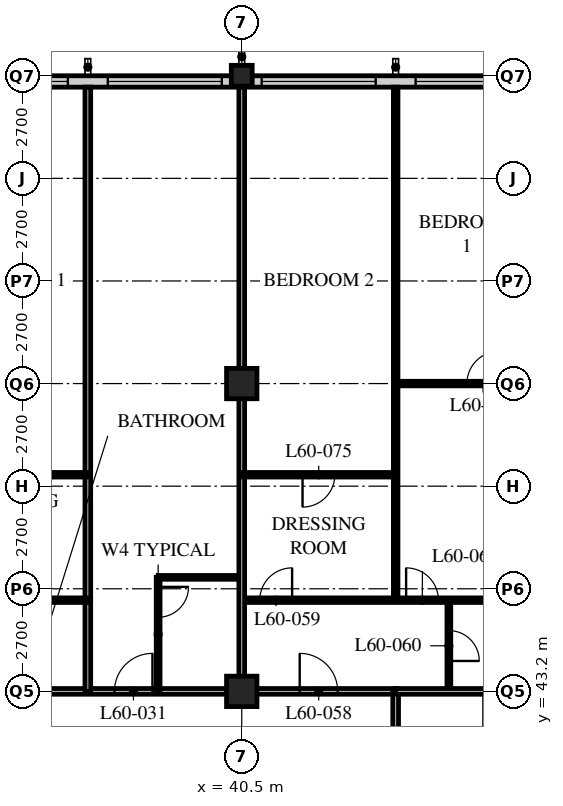
"""IFC4 building model, lengths in metres.
Left out: names, types, materials, properties, quantities, classifications, styles, units other than length and angle.
Written with IfcOpenShell. Run it as: python <this file> out.ifc"""

import sys

from ifc_helpers import new_model, si_unit, direction, frame, frame_2d, origin, origin_2d, place, context, subcontext, project, spatial, rectangle, hollow_rectangle, extrude, element, fill, save


model = new_model("IFC4")
c1 = context("Model", 3, precision=1e-05, world=origin(), true_north=direction((0.0, 1.0)))
c2 = subcontext(c1, "Body", "Model", "MODEL_VIEW")
j1 = project(units=[si_unit("LENGTHUNIT", "METRE"), si_unit("PLANEANGLEUNIT", "RADIAN")], contexts=[c1])
p1 = place(None, origin())
s1 = spatial("IfcSite", under=j1, at=p1, CompositionType="ELEMENT")
p2 = place(p1, origin())
s2 = spatial("IfcBuilding", under=s1, at=p2, CompositionType="ELEMENT")
p3 = place(p2, frame((0.0, 0.0, 231.6)))
s3 = spatial("IfcBuildingStorey", under=s2, at=p3, CompositionType="ELEMENT", Elevation=231.6)
for number, where, z_axis, x_axis in (
    (1, (40.5, 43.2, 0.0), (0.0, 0.0, 1.0), (1.0, 0.0, 0.0)),
    (2, (40.5, 51.3, 0.0), (0.0, 0.0, 1.0), (1.0, 0.0, 0.0)),
):
    element("IfcColumn", number, at=place(p3, frame(where, z_axis=z_axis, x_axis=x_axis)), inside=s3, PredefinedType="COLUMN", context=c2, shape_type="SweptSolid", body=[
        extrude(hollow_rectangle(XDim=0.8, YDim=0.8, WallThickness=0.08, at=origin_2d()), origin(), (0.0, 0.0, 1.0), 3.6),
    ])
p4 = place(p3, frame((40.5, 59.4, 0.0), z_axis=(0.0, 0.0, 1.0), x_axis=(1.0, 0.0, 0.0)))
e3 = element("IfcColumn", 3, at=p4, inside=s3, PredefinedType="COLUMN", context=c2, shape_type="SweptSolid", body=[
    extrude(hollow_rectangle(XDim=0.55, YDim=0.55, WallThickness=0.045, at=origin_2d()), origin(), (0.0, 0.0, 1.0), 3.6),
])
p5 = place(p3, frame((48.3, 59.25, 0.0), z_axis=(0.0, 0.0, 1.0), x_axis=(-1.0, 0.0, 0.0)))
e4 = element("IfcWall", 4, at=p5, inside=s3, PredefinedType="SOLIDWALL", context=c2, shape_type="SweptSolid", body=[
    extrude(rectangle(XDim=40.2, YDim=0.3, at=frame_2d((20.1, 0.0))), origin(), (0.0, 0.0, 1.0), 2.35),
])
p6 = place(p5, frame((0.225, 0.0, 0.6)))
e5 = element("IfcOpeningElement", 5, at=p6, cuts=e4, PredefinedType="OPENING", context=c2, shape_type="SweptSolid", body=[
    extrude(rectangle(XDim=3.0, YDim=1.7, at=frame_2d((1.5, 0.85))), frame((0.0, 0.16, 0.0), z_axis=(0.0, -1.0, 0.0), x_axis=(1.0, 0.0, 0.0)), (0.0, 0.0, 1.0), 0.32),
])
p7 = place(p5, frame((4.275, 0.0, 0.6)))
e6 = element("IfcOpeningElement", 6, at=p7, cuts=e4, PredefinedType="OPENING", context=c2, shape_type="SweptSolid", body=[
    extrude(rectangle(XDim=3.0, YDim=1.7, at=frame_2d((1.5, 0.85))), frame((0.0, 0.16, 0.0), z_axis=(0.0, -1.0, 0.0), x_axis=(1.0, 0.0, 0.0)), (0.0, 0.0, 1.0), 0.32),
])
p8 = place(p5, frame((8.325, 0.0, 0.6)))
e7 = element("IfcOpeningElement", 7, at=p8, cuts=e4, PredefinedType="OPENING", context=c2, shape_type="SweptSolid", body=[
    extrude(rectangle(XDim=3.0, YDim=1.7, at=frame_2d((1.5, 0.85))), frame((0.0, 0.16, 0.0), z_axis=(0.0, -1.0, 0.0), x_axis=(1.0, 0.0, 0.0)), (0.0, 0.0, 1.0), 0.32),
])
p9 = place(p5, frame((12.375, 0.0, 0.6)))
e8 = element("IfcOpeningElement", 8, at=p9, cuts=e4, PredefinedType="OPENING", context=c2, shape_type="SweptSolid", body=[
    extrude(rectangle(XDim=3.0, YDim=1.7, at=frame_2d((1.5, 0.85))), frame((0.0, 0.16, 0.0), z_axis=(0.0, -1.0, 0.0), x_axis=(1.0, 0.0, 0.0)), (0.0, 0.0, 1.0), 0.32),
])
p10 = place(p5, frame((16.425, 0.0, 0.6)))
e9 = element("IfcOpeningElement", 9, at=p10, cuts=e4, PredefinedType="OPENING", context=c2, shape_type="SweptSolid", body=[
    extrude(rectangle(XDim=3.0, YDim=1.7, at=frame_2d((1.5, 0.85))), frame((0.0, 0.16, 0.0), z_axis=(0.0, -1.0, 0.0), x_axis=(1.0, 0.0, 0.0)), (0.0, 0.0, 1.0), 0.32),
])
p11 = place(p5, frame((20.475, 0.0, 0.6)))
e10 = element("IfcOpeningElement", 10, at=p11, cuts=e4, PredefinedType="OPENING", context=c2, shape_type="SweptSolid", body=[
    extrude(rectangle(XDim=3.0, YDim=1.7, at=frame_2d((1.5, 0.85))), frame((0.0, 0.16, 0.0), z_axis=(0.0, -1.0, 0.0), x_axis=(1.0, 0.0, 0.0)), (0.0, 0.0, 1.0), 0.32),
])
p12 = place(p5, frame((24.525, 0.0, 0.6)))
e11 = element("IfcOpeningElement", 11, at=p12, cuts=e4, PredefinedType="OPENING", context=c2, shape_type="SweptSolid", body=[
    extrude(rectangle(XDim=3.0, YDim=1.7, at=frame_2d((1.5, 0.85))), frame((0.0, 0.16, 0.0), z_axis=(0.0, -1.0, 0.0), x_axis=(1.0, 0.0, 0.0)), (0.0, 0.0, 1.0), 0.32),
])
p13 = place(p5, frame((28.575, 0.0, 0.6)))
e12 = element("IfcOpeningElement", 12, at=p13, cuts=e4, PredefinedType="OPENING", context=c2, shape_type="SweptSolid", body=[
    extrude(rectangle(XDim=3.0, YDim=1.7, at=frame_2d((1.5, 0.85))), frame((0.0, 0.16, 0.0), z_axis=(0.0, -1.0, 0.0), x_axis=(1.0, 0.0, 0.0)), (0.0, 0.0, 1.0), 0.32),
])
p14 = place(p5, frame((32.625, 0.0, 0.6)))
e13 = element("IfcOpeningElement", 13, at=p14, cuts=e4, PredefinedType="OPENING", context=c2, shape_type="SweptSolid", body=[
    extrude(rectangle(XDim=3.0, YDim=1.7, at=frame_2d((1.5, 0.85))), frame((0.0, 0.16, 0.0), z_axis=(0.0, -1.0, 0.0), x_axis=(1.0, 0.0, 0.0)), (0.0, 0.0, 1.0), 0.32),
])
p15 = place(p5, frame((36.675, 0.0, 0.6)))
e14 = element("IfcOpeningElement", 14, at=p15, cuts=e4, PredefinedType="OPENING", context=c2, shape_type="SweptSolid", body=[
    extrude(rectangle(XDim=3.0, YDim=1.7, at=frame_2d((1.5, 0.85))), frame((0.0, 0.16, 0.0), z_axis=(0.0, -1.0, 0.0), x_axis=(1.0, 0.0, 0.0)), (0.0, 0.0, 1.0), 0.32),
])
p16 = place(p3, frame((8.1, 43.2, 0.0), z_axis=(0.0, 0.0, 1.0), x_axis=(1.0, 0.0, 0.0)))
e15 = element("IfcWall", 15, at=p16, inside=s3, PredefinedType="PARTITIONING", context=c2, shape_type="SweptSolid", body=[
    extrude(rectangle(XDim=36.45, YDim=0.15, at=frame_2d((18.225, 0.0))), origin(), (0.0, 0.0, 1.0), 2.35),
])
p17 = place(p16, frame((4.45, 0.0, 0.0)))
e16 = element("IfcOpeningElement", 16, at=p17, cuts=e15, PredefinedType="OPENING", context=c2, shape_type="SweptSolid", body=[
    extrude(rectangle(XDim=1.0, YDim=2.1, at=frame_2d((0.5, 1.05))), frame((0.0, 0.085, 0.0), z_axis=(0.0, -1.0, 0.0), x_axis=(1.0, 0.0, 0.0)), (0.0, 0.0, 1.0), 0.17),
])
p18 = place(p16, frame((17.1, 0.0, 0.0)))
e17 = element("IfcOpeningElement", 17, at=p18, cuts=e15, PredefinedType="OPENING", context=c2, shape_type="SweptSolid", body=[
    extrude(rectangle(XDim=1.0, YDim=2.1, at=frame_2d((0.5, 1.05))), frame((0.0, 0.085, 0.0), z_axis=(0.0, -1.0, 0.0), x_axis=(1.0, 0.0, 0.0)), (0.0, 0.0, 1.0), 0.17),
])
p19 = place(p16, frame((29.05, 0.0, 0.0)))
e18 = element("IfcOpeningElement", 18, at=p19, cuts=e15, PredefinedType="OPENING", context=c2, shape_type="SweptSolid", body=[
    extrude(rectangle(XDim=1.0, YDim=2.1, at=frame_2d((0.5, 1.05))), frame((0.0, 0.085, 0.0), z_axis=(0.0, -1.0, 0.0), x_axis=(1.0, 0.0, 0.0)), (0.0, 0.0, 1.0), 0.17),
])
p20 = place(p16, frame((33.925, 0.0, 0.0)))
e19 = element("IfcOpeningElement", 19, at=p20, cuts=e15, PredefinedType="OPENING", context=c2, shape_type="SweptSolid", body=[
    extrude(rectangle(XDim=1.0, YDim=2.1, at=frame_2d((0.5, 1.05))), frame((0.0, 0.085, 0.0), z_axis=(0.0, -1.0, 0.0), x_axis=(1.0, 0.0, 0.0)), (0.0, 0.0, 1.0), 0.17),
])
p21 = place(p16, frame((1.525, 0.0, 0.0)))
e20 = element("IfcOpeningElement", 20, at=p21, cuts=e15, PredefinedType="OPENING", context=c2, shape_type="SweptSolid", body=[
    extrude(rectangle(XDim=1.0, YDim=2.1, at=frame_2d((0.5, 1.05))), frame((0.0, 0.085, 0.0), z_axis=(0.0, -1.0, 0.0), x_axis=(1.0, 0.0, 0.0)), (0.0, 0.0, 1.0), 0.17),
])
p22 = place(p3, frame((44.55, 18.9, 0.0), z_axis=(0.0, 0.0, 1.0), x_axis=(0.0, 1.0, 0.0)))
e21 = element("IfcWall", 21, at=p22, inside=s3, PredefinedType="PARTITIONING", context=c2, shape_type="SweptSolid", body=[
    extrude(rectangle(XDim=24.3, YDim=0.15, at=frame_2d((12.15, 0.0))), origin(), (0.0, 0.0, 1.0), 3.35),
])
p23 = place(p22, frame((0.4, 0.0, 0.0)))
e22 = element("IfcOpeningElement", 22, at=p23, cuts=e21, PredefinedType="OPENING", context=c2, shape_type="SweptSolid", body=[
    extrude(rectangle(XDim=1.0, YDim=2.1, at=frame_2d((0.5, 1.05))), frame((0.0, 0.085, 0.0), z_axis=(0.0, -1.0, 0.0), x_axis=(1.0, 0.0, 0.0)), (0.0, 0.0, 1.0), 0.17),
])
p24 = place(p22, frame((16.6, 0.0, 0.0)))
e23 = element("IfcOpeningElement", 23, at=p24, cuts=e21, PredefinedType="OPENING", context=c2, shape_type="SweptSolid", body=[
    extrude(rectangle(XDim=1.0, YDim=2.1, at=frame_2d((0.5, 1.05))), frame((0.0, 0.085, 0.0), z_axis=(0.0, -1.0, 0.0), x_axis=(1.0, 0.0, 0.0)), (0.0, 0.0, 1.0), 0.17),
])
p25 = place(p3, frame((36.45, 43.2, 0.0), z_axis=(0.0, 0.0, 1.0), x_axis=(0.0, 1.0, 0.0)))
e24 = element("IfcWall", 24, at=p25, inside=s3, PredefinedType="PARTITIONING", context=c2, shape_type="SweptSolid", body=[
    extrude(rectangle(XDim=15.9, YDim=0.15, at=frame_2d((7.95, 0.0))), origin(), (0.0, 0.0, 1.0), 3.35),
])
p26 = place(p3, frame((38.3, 46.2, 0.0), z_axis=(0.0, 0.0, 1.0), x_axis=(1.0, 0.0, 0.0)))
e25 = element("IfcWall", 25, at=p26, inside=s3, PredefinedType="PARTITIONING", context=c2, shape_type="SweptSolid", body=[
    extrude(rectangle(XDim=2.2, YDim=0.1, at=frame_2d((1.1, 0.0))), origin(), (0.0, 0.0, 1.0), 3.35),
])
p27 = place(p3, frame((38.3, 43.2, 0.0), z_axis=(0.0, 0.0, 1.0), x_axis=(0.0, 1.0, 0.0)))
e26 = element("IfcWall", 26, at=p27, inside=s3, PredefinedType="PARTITIONING", context=c2, shape_type="SweptSolid", body=[
    extrude(rectangle(XDim=3.0, YDim=0.1, at=frame_2d((1.5, 0.0))), origin(), (0.0, 0.0, 1.0), 3.35),
])
p28 = place(p27, frame((1.95, 0.0, 0.0)))
e27 = element("IfcOpeningElement", 27, at=p28, cuts=e26, PredefinedType="OPENING", context=c2, shape_type="SweptSolid", body=[
    extrude(rectangle(XDim=0.8, YDim=2.1, at=frame_2d((0.4, 1.05))), frame((0.0, 0.06, 0.0), z_axis=(0.0, -1.0, 0.0), x_axis=(1.0, 0.0, 0.0)), (0.0, 0.0, 1.0), 0.12),
])
p29 = place(p3, frame((40.5, 45.6, 0.0), z_axis=(0.0, 0.0, 1.0), x_axis=(1.0, 0.0, 0.0)))
e28 = element("IfcWall", 28, at=p29, inside=s3, PredefinedType="PARTITIONING", context=c2, shape_type="SweptSolid", body=[
    extrude(rectangle(XDim=8.05, YDim=0.12, at=frame_2d((4.025, 0.0))), origin(), (0.0, 0.0, 1.0), 3.35),
])
p30 = place(p29, frame((0.475, 0.0, 0.0)))
e29 = element("IfcOpeningElement", 29, at=p30, cuts=e28, PredefinedType="OPENING", context=c2, shape_type="SweptSolid", body=[
    extrude(rectangle(XDim=0.85, YDim=2.1, at=frame_2d((0.425, 1.05))), frame((0.0, 0.07, 0.0), z_axis=(0.0, -1.0, 0.0), x_axis=(1.0, 0.0, 0.0)), (0.0, 0.0, 1.0), 0.14),
])
p31 = place(p29, frame((4.325, 0.0, 0.0)))
e30 = element("IfcOpeningElement", 30, at=p31, cuts=e28, PredefinedType="OPENING", context=c2, shape_type="SweptSolid", body=[
    extrude(rectangle(XDim=0.85, YDim=2.1, at=frame_2d((0.425, 1.05))), frame((0.0, 0.07, 0.0), z_axis=(0.0, -1.0, 0.0), x_axis=(1.0, 0.0, 0.0)), (0.0, 0.0, 1.0), 0.14),
])
p32 = place(p3, frame((45.95, 43.2, 0.0), z_axis=(0.0, 0.0, 1.0), x_axis=(0.0, 1.0, 0.0)))
e31 = element("IfcWall", 31, at=p32, inside=s3, PredefinedType="PARTITIONING", context=c2, shape_type="SweptSolid", body=[
    extrude(rectangle(XDim=2.4, YDim=0.1, at=frame_2d((1.2, 0.0))), origin(), (0.0, 0.0, 1.0), 3.35),
])
p33 = place(p32, frame((0.8, 0.0, 0.0)))
e32 = element("IfcOpeningElement", 32, at=p33, cuts=e31, PredefinedType="OPENING", context=c2, shape_type="SweptSolid", body=[
    extrude(rectangle(XDim=0.8, YDim=2.1, at=frame_2d((0.4, 1.05))), frame((0.0, 0.06, 0.0), z_axis=(0.0, -1.0, 0.0), x_axis=(1.0, 0.0, 0.0)), (0.0, 0.0, 1.0), 0.12),
])
p34 = place(p3, frame((44.55, 45.6, 0.0), z_axis=(0.0, 0.0, 1.0), x_axis=(0.0, 1.0, 0.0)))
e33 = element("IfcWall", 33, at=p34, inside=s3, PredefinedType="PARTITIONING", context=c2, shape_type="SweptSolid", body=[
    extrude(rectangle(XDim=13.5, YDim=0.12, at=frame_2d((6.75, 0.0))), origin(), (0.0, 0.0, 1.0), 3.35),
])
p35 = place(p3, frame((44.55, 51.3, 0.0), z_axis=(0.0, 0.0, 1.0), x_axis=(1.0, 0.0, 0.0)))
e34 = element("IfcWall", 34, at=p35, inside=s3, PredefinedType="PARTITIONING", context=c2, shape_type="SweptSolid", body=[
    extrude(rectangle(XDim=7.8, YDim=0.12, at=frame_2d((3.9, 0.0))), origin(), (0.0, 0.0, 1.0), 2.588),
])
p36 = place(p35, frame((1.875, 0.0, 0.0)))
e35 = element("IfcOpeningElement", 35, at=p36, cuts=e34, PredefinedType="OPENING", context=c2, shape_type="SweptSolid", body=[
    extrude(rectangle(XDim=0.85, YDim=2.1, at=frame_2d((0.425, 1.05))), frame((0.0, 0.07, 0.0), z_axis=(0.0, -1.0, 0.0), x_axis=(1.0, 0.0, 0.0)), (0.0, 0.0, 1.0), 0.14),
])
p37 = place(p3, frame((44.55, 43.2, 0.0), z_axis=(0.0, 0.0, 1.0), x_axis=(1.0, 0.0, 0.0)))
e36 = element("IfcWall", 36, at=p37, inside=s3, PredefinedType="PARTITIONING", context=c2, shape_type="SweptSolid", body=[
    extrude(rectangle(XDim=11.85, YDim=0.15, at=frame_2d((5.925, 0.0))), origin(), (0.0, 0.0, 1.0), 2.35),
])
p38 = place(p3, frame((40.5, 43.2, 0.0), z_axis=(0.0, 0.0, 1.0), x_axis=(0.0, 1.0, 0.0)))
e37 = element("IfcWall", 37, at=p38, inside=s3, PredefinedType="PARTITIONING", context=c2, shape_type="SweptSolid", body=[
    extrude(rectangle(XDim=15.9, YDim=0.15, at=frame_2d((7.95, 0.0))), origin(), (0.0, 0.0, 1.0), 2.35),
])
p39 = place(p3, frame((4.1, 45.6, 0.0), z_axis=(0.0, 0.0, 1.0), x_axis=(1.0, 0.0, 0.0)))
e38 = element("IfcWall", 38, at=p39, inside=s3, PredefinedType="PARTITIONING", context=c2, shape_type="SweptSolid", body=[
    extrude(rectangle(XDim=32.35, YDim=0.12, at=frame_2d((16.175, 0.0))), origin(), (0.0, 0.0, 1.0), 3.35),
])
p40 = place(p39, frame((9.025, 0.0, 0.0)))
e39 = element("IfcOpeningElement", 39, at=p40, cuts=e38, PredefinedType="OPENING", context=c2, shape_type="SweptSolid", body=[
    extrude(rectangle(XDim=0.85, YDim=2.1, at=frame_2d((0.425, 1.05))), frame((0.0, 0.07, 0.0), z_axis=(0.0, -1.0, 0.0), x_axis=(1.0, 0.0, 0.0)), (0.0, 0.0, 1.0), 0.14),
])
p41 = place(p39, frame((16.475, 0.0, 0.0)))
e40 = element("IfcOpeningElement", 40, at=p41, cuts=e38, PredefinedType="OPENING", context=c2, shape_type="SweptSolid", body=[
    extrude(rectangle(XDim=0.85, YDim=2.1, at=frame_2d((0.425, 1.05))), frame((0.0, 0.07, 0.0), z_axis=(0.0, -1.0, 0.0), x_axis=(1.0, 0.0, 0.0)), (0.0, 0.0, 1.0), 0.14),
])
p42 = place(p39, frame((21.175, 0.0, 0.0)))
e41 = element("IfcOpeningElement", 41, at=p42, cuts=e38, PredefinedType="OPENING", context=c2, shape_type="SweptSolid", body=[
    extrude(rectangle(XDim=0.85, YDim=2.1, at=frame_2d((0.425, 1.05))), frame((0.0, 0.07, 0.0), z_axis=(0.0, -1.0, 0.0), x_axis=(1.0, 0.0, 0.0)), (0.0, 0.0, 1.0), 0.14),
])
p43 = place(p39, frame((28.625, 0.0, 0.0)))
e42 = element("IfcOpeningElement", 42, at=p43, cuts=e38, PredefinedType="OPENING", context=c2, shape_type="SweptSolid", body=[
    extrude(rectangle(XDim=0.85, YDim=2.1, at=frame_2d((0.425, 1.05))), frame((0.0, 0.07, 0.0), z_axis=(0.0, -1.0, 0.0), x_axis=(1.0, 0.0, 0.0)), (0.0, 0.0, 1.0), 0.14),
])
p44 = place(p39, frame((6.725, 0.0, 0.0)))
e43 = element("IfcOpeningElement", 43, at=p44, cuts=e38, PredefinedType="OPENING", context=c2, shape_type="SweptSolid", body=[
    extrude(rectangle(XDim=0.85, YDim=2.1, at=frame_2d((0.425, 1.05))), frame((0.0, 0.07, 0.0), z_axis=(0.0, -1.0, 0.0), x_axis=(1.0, 0.0, 0.0)), (0.0, 0.0, 1.0), 0.14),
])
p45 = place(p39, frame((2.875, 0.0, 0.0)))
e44 = element("IfcOpeningElement", 44, at=p45, cuts=e38, PredefinedType="OPENING", context=c2, shape_type="SweptSolid", body=[
    extrude(rectangle(XDim=0.85, YDim=2.1, at=frame_2d((0.425, 1.05))), frame((0.0, 0.07, 0.0), z_axis=(0.0, -1.0, 0.0), x_axis=(1.0, 0.0, 0.0)), (0.0, 0.0, 1.0), 0.14),
])
p46 = place(p3, frame((32.4, 48.9, 0.0), z_axis=(0.0, 0.0, 1.0), x_axis=(1.0, 0.0, 0.0)))
e45 = element("IfcWall", 45, at=p46, inside=s3, PredefinedType="PARTITIONING", context=c2, shape_type="SweptSolid", body=[
    extrude(rectangle(XDim=4.05, YDim=0.12, at=frame_2d((2.025, 0.0))), origin(), (0.0, 0.0, 1.0), 3.35),
])
p47 = place(p46, frame((1.6, 0.0, 0.0)))
e46 = element("IfcOpeningElement", 46, at=p47, cuts=e45, PredefinedType="OPENING", context=c2, shape_type="SweptSolid", body=[
    extrude(rectangle(XDim=0.85, YDim=2.1, at=frame_2d((0.425, 1.05))), frame((0.0, 0.07, 0.0), z_axis=(0.0, -1.0, 0.0), x_axis=(1.0, 0.0, 0.0)), (0.0, 0.0, 1.0), 0.14),
])
p48 = place(p3, frame((40.5, 48.9, 0.0), z_axis=(0.0, 0.0, 1.0), x_axis=(1.0, 0.0, 0.0)))
e47 = element("IfcWall", 47, at=p48, inside=s3, PredefinedType="PARTITIONING", context=c2, shape_type="SweptSolid", body=[
    extrude(rectangle(XDim=4.05, YDim=0.12, at=frame_2d((2.025, 0.0))), origin(), (0.0, 0.0, 1.0), 3.35),
])
p49 = place(p48, frame((1.6, 0.0, 0.0)))
e48 = element("IfcOpeningElement", 48, at=p49, cuts=e47, PredefinedType="OPENING", context=c2, shape_type="SweptSolid", body=[
    extrude(rectangle(XDim=0.85, YDim=2.1, at=frame_2d((0.425, 1.05))), frame((0.0, 0.07, 0.0), z_axis=(0.0, -1.0, 0.0), x_axis=(1.0, 0.0, 0.0)), (0.0, 0.0, 1.0), 0.14),
])
p50 = place(p6, origin())
e49 = element("IfcWindow", 49, at=p50, inside=s3, PartitioningType="SINGLE_PANEL", PredefinedType="WINDOW", context=c2, shape_type="SweptSolid", body=[
    extrude(rectangle(XDim=3.0, YDim=1.7, at=frame_2d((1.5, 0.85))), frame((0.0, 0.03, 0.0), z_axis=(0.0, -1.0, 0.0), x_axis=(1.0, 0.0, 0.0)), (0.0, 0.0, 1.0), 0.06),
])
fill(e5, e49)
p51 = place(p7, origin())
e50 = element("IfcWindow", 50, at=p51, inside=s3, PartitioningType="SINGLE_PANEL", PredefinedType="WINDOW", context=c2, shape_type="SweptSolid", body=[
    extrude(rectangle(XDim=3.0, YDim=1.7, at=frame_2d((1.5, 0.85))), frame((0.0, 0.03, 0.0), z_axis=(0.0, -1.0, 0.0), x_axis=(1.0, 0.0, 0.0)), (0.0, 0.0, 1.0), 0.06),
])
fill(e6, e50)
p52 = place(p8, origin())
e51 = element("IfcWindow", 51, at=p52, inside=s3, PartitioningType="SINGLE_PANEL", PredefinedType="WINDOW", context=c2, shape_type="SweptSolid", body=[
    extrude(rectangle(XDim=3.0, YDim=1.7, at=frame_2d((1.5, 0.85))), frame((0.0, 0.03, 0.0), z_axis=(0.0, -1.0, 0.0), x_axis=(1.0, 0.0, 0.0)), (0.0, 0.0, 1.0), 0.06),
])
fill(e7, e51)
p53 = place(p9, origin())
e52 = element("IfcWindow", 52, at=p53, inside=s3, PartitioningType="SINGLE_PANEL", PredefinedType="WINDOW", context=c2, shape_type="SweptSolid", body=[
    extrude(rectangle(XDim=3.0, YDim=1.7, at=frame_2d((1.5, 0.85))), frame((0.0, 0.03, 0.0), z_axis=(0.0, -1.0, 0.0), x_axis=(1.0, 0.0, 0.0)), (0.0, 0.0, 1.0), 0.06),
])
fill(e8, e52)
p54 = place(p28, origin())
e53 = element("IfcDoor", 53, at=p54, inside=s3, OperationType="SINGLE_SWING_LEFT", PredefinedType="DOOR", context=c2, shape_type="SweptSolid", body=[
    extrude(rectangle(XDim=0.8, YDim=2.1, at=frame_2d((0.4, 1.05))), frame((0.0, 0.025, 0.0), z_axis=(0.0, -1.0, 0.0), x_axis=(1.0, 0.0, 0.0)), (0.0, 0.0, 1.0), 0.05),
])
fill(e27, e53)
p55 = place(p19, origin())
e54 = element("IfcDoor", 54, at=p55, inside=s3, OperationType="SINGLE_SWING_RIGHT", PredefinedType="DOOR", context=c2, shape_type="SweptSolid", body=[
    extrude(rectangle(XDim=1.0, YDim=2.1, at=frame_2d((0.5, 1.05))), frame((0.0, 0.025, 0.0), z_axis=(0.0, -1.0, 0.0), x_axis=(1.0, 0.0, 0.0)), (0.0, 0.0, 1.0), 0.05),
])
fill(e18, e54)
p56 = place(p20, origin())
e55 = element("IfcDoor", 55, at=p56, inside=s3, OperationType="SINGLE_SWING_LEFT", PredefinedType="DOOR", context=c2, shape_type="SweptSolid", body=[
    extrude(rectangle(XDim=1.0, YDim=2.1, at=frame_2d((0.5, 1.05))), frame((0.0, 0.025, 0.0), z_axis=(0.0, -1.0, 0.0), x_axis=(1.0, 0.0, 0.0)), (0.0, 0.0, 1.0), 0.05),
])
fill(e19, e55)
p57 = place(p30, origin())
e56 = element("IfcDoor", 56, at=p57, inside=s3, OperationType="SINGLE_SWING_RIGHT", PredefinedType="DOOR", context=c2, shape_type="SweptSolid", body=[
    extrude(rectangle(XDim=0.85, YDim=2.1, at=frame_2d((0.425, 1.05))), frame((0.0, 0.025, 0.0), z_axis=(0.0, -1.0, 0.0), x_axis=(1.0, 0.0, 0.0)), (0.0, 0.0, 1.0), 0.05),
])
fill(e29, e56)
p58 = place(p33, origin())
e57 = element("IfcDoor", 57, at=p58, inside=s3, OperationType="SINGLE_SWING_RIGHT", PredefinedType="DOOR", context=c2, shape_type="SweptSolid", body=[
    extrude(rectangle(XDim=0.8, YDim=2.1, at=frame_2d((0.4, 1.05))), frame((0.0, 0.025, 0.0), z_axis=(0.0, -1.0, 0.0), x_axis=(1.0, 0.0, 0.0)), (0.0, 0.0, 1.0), 0.05),
])
fill(e32, e57)
p59 = place(p31, origin())
e58 = element("IfcDoor", 58, at=p59, inside=s3, OperationType="SINGLE_SWING_LEFT", PredefinedType="DOOR", context=c2, shape_type="SweptSolid", body=[
    extrude(rectangle(XDim=0.85, YDim=2.1, at=frame_2d((0.425, 1.05))), frame((0.0, 0.025, 0.0), z_axis=(0.0, -1.0, 0.0), x_axis=(1.0, 0.0, 0.0)), (0.0, 0.0, 1.0), 0.05),
])
fill(e30, e58)
p60 = place(p36, origin())
e59 = element("IfcDoor", 59, at=p60, inside=s3, OperationType="SINGLE_SWING_RIGHT", PredefinedType="DOOR", context=c2, shape_type="SweptSolid", body=[
    extrude(rectangle(XDim=0.85, YDim=2.1, at=frame_2d((0.425, 1.05))), frame((0.0, 0.025, 0.0), z_axis=(0.0, -1.0, 0.0), x_axis=(1.0, 0.0, 0.0)), (0.0, 0.0, 1.0), 0.05),
])
fill(e35, e59)
p61 = place(p49, origin())
e60 = element("IfcDoor", 60, at=p61, inside=s3, OperationType="SINGLE_SWING_RIGHT", PredefinedType="DOOR", context=c2, shape_type="SweptSolid", body=[
    extrude(rectangle(XDim=0.85, YDim=2.1, at=frame_2d((0.425, 1.05))), frame((0.0, 0.025, 0.0), z_axis=(0.0, -1.0, 0.0), x_axis=(1.0, 0.0, 0.0)), (0.0, 0.0, 1.0), 0.05),
])
fill(e48, e60)
save(model, sys.argv[1])
